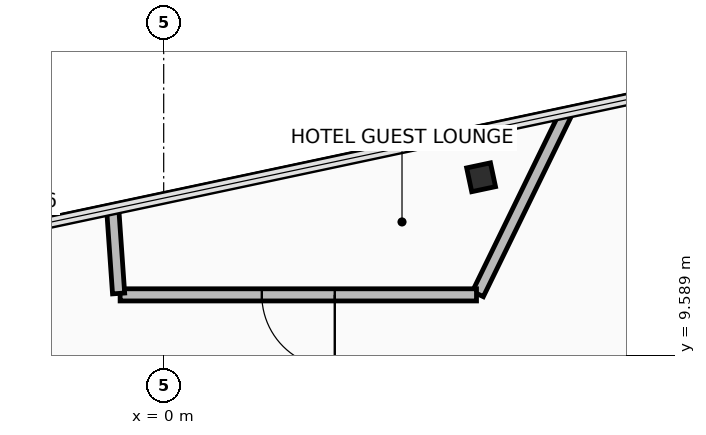
"""IFC4 building model, lengths in metres.
Left out: names, types, materials, properties, quantities, classifications, styles, units other than length and angle.
Written with IfcOpenShell. Run it as: python <this file> out.ifc"""

import sys

from ifc_helpers import new_model, si_unit, direction, frame, frame_2d, origin, origin_2d, place, context, subcontext, project, spatial, rectangle, hollow_rectangle, extrude, element, fill, save


model = new_model("IFC4")
c1 = context("Model", 3, precision=1e-05, world=origin(), true_north=direction((0.0, 1.0)))
c2 = subcontext(c1, "Body", "Model", "MODEL_VIEW")
j1 = project(units=[si_unit("LENGTHUNIT", "METRE"), si_unit("PLANEANGLEUNIT", "RADIAN")], contexts=[c1])
p1 = place(None, origin())
s1 = spatial("IfcSite", under=j1, at=p1, CompositionType="ELEMENT")
p2 = place(p1, origin())
s2 = spatial("IfcBuilding", under=s1, at=p2, CompositionType="ELEMENT")
p3 = place(p2, frame((0.0, 0.0, 287.05)))
s3 = spatial("IfcBuildingStorey", under=s2, at=p3, CompositionType="ELEMENT", Elevation=287.05)
p4 = place(p3, frame((5.22, 12.514, 0.0), z_axis=(0.0, 0.0, 1.0), x_axis=(0.978147237858, 0.207913398007, 0.0)))
e1 = element("IfcColumn", 1, at=p4, inside=s3, PredefinedType="COLUMN", context=c2, shape_type="SweptSolid", body=[
    extrude(hollow_rectangle(XDim=0.4, YDim=0.4, WallThickness=0.025, at=origin_2d()), origin(), (0.0, 0.0, 1.0), 3.65),
])
p5 = place(p3, frame((6.623, 13.579, 0.0), z_axis=(0.0, 0.0, 1.0), x_axis=(-0.438399007469, -0.898780457203, 0.0)))
e2 = element("IfcWall", 2, at=p5, inside=s3, PredefinedType="PARTITIONING", context=c2, shape_type="SweptSolid", body=[
    extrude(rectangle(XDim=3.321, YDim=0.2, at=frame_2d((1.66, 0.0))), origin(), (0.0, 0.0, 1.0), 2.81),
])
p6 = place(p3, frame((5.145, 10.58, 0.0), z_axis=(0.0, 0.0, 1.0), x_axis=(-1.0, 0.0, 0.0)))
e3 = element("IfcWall", 3, at=p6, inside=s3, PredefinedType="PARTITIONING", context=c2, shape_type="SweptSolid", body=[
    extrude(rectangle(XDim=5.861, YDim=0.2, at=frame_2d((2.931, 0.0))), origin(), (0.0, 0.0, 1.0), 2.96),
])
p7 = place(p6, frame((2.331, 0.0, 0.0)))
e4 = element("IfcOpeningElement", 4, at=p7, cuts=e3, PredefinedType="OPENING", context=c2, shape_type="SweptSolid", body=[
    extrude(rectangle(XDim=1.2, YDim=2.15, at=frame_2d((0.6, 1.075))), frame((0.0, 0.11, 0.0), z_axis=(0.0, -1.0, 0.0), x_axis=(1.0, 0.0, 0.0)), (0.0, 0.0, 1.0), 0.22),
])
p8 = place(p3, frame((-0.741, 10.603, 0.0), z_axis=(0.0, 0.0, 1.0), x_axis=(-0.069804319126, 0.997560703432, 0.0)))
e5 = element("IfcWall", 5, at=p8, inside=s3, PredefinedType="PARTITIONING", context=c2, shape_type="SweptSolid", body=[
    extrude(rectangle(XDim=1.371, YDim=0.2, at=frame_2d((0.686, 0.0))), origin(), (0.0, 0.0, 1.0), 2.81),
])
p9 = place(p7, origin())
e6 = element("IfcDoor", 6, at=p9, inside=s3, OperationType="SINGLE_SWING_LEFT", PredefinedType="DOOR", context=c2, shape_type="SweptSolid", body=[
    extrude(rectangle(XDim=1.2, YDim=2.15, at=frame_2d((0.6, 1.075))), frame((0.0, 0.025, 0.0), z_axis=(0.0, -1.0, 0.0), x_axis=(1.0, 0.0, 0.0)), (0.0, 0.0, 1.0), 0.05),
])
fill(e4, e6)
save(model, sys.argv[1])
